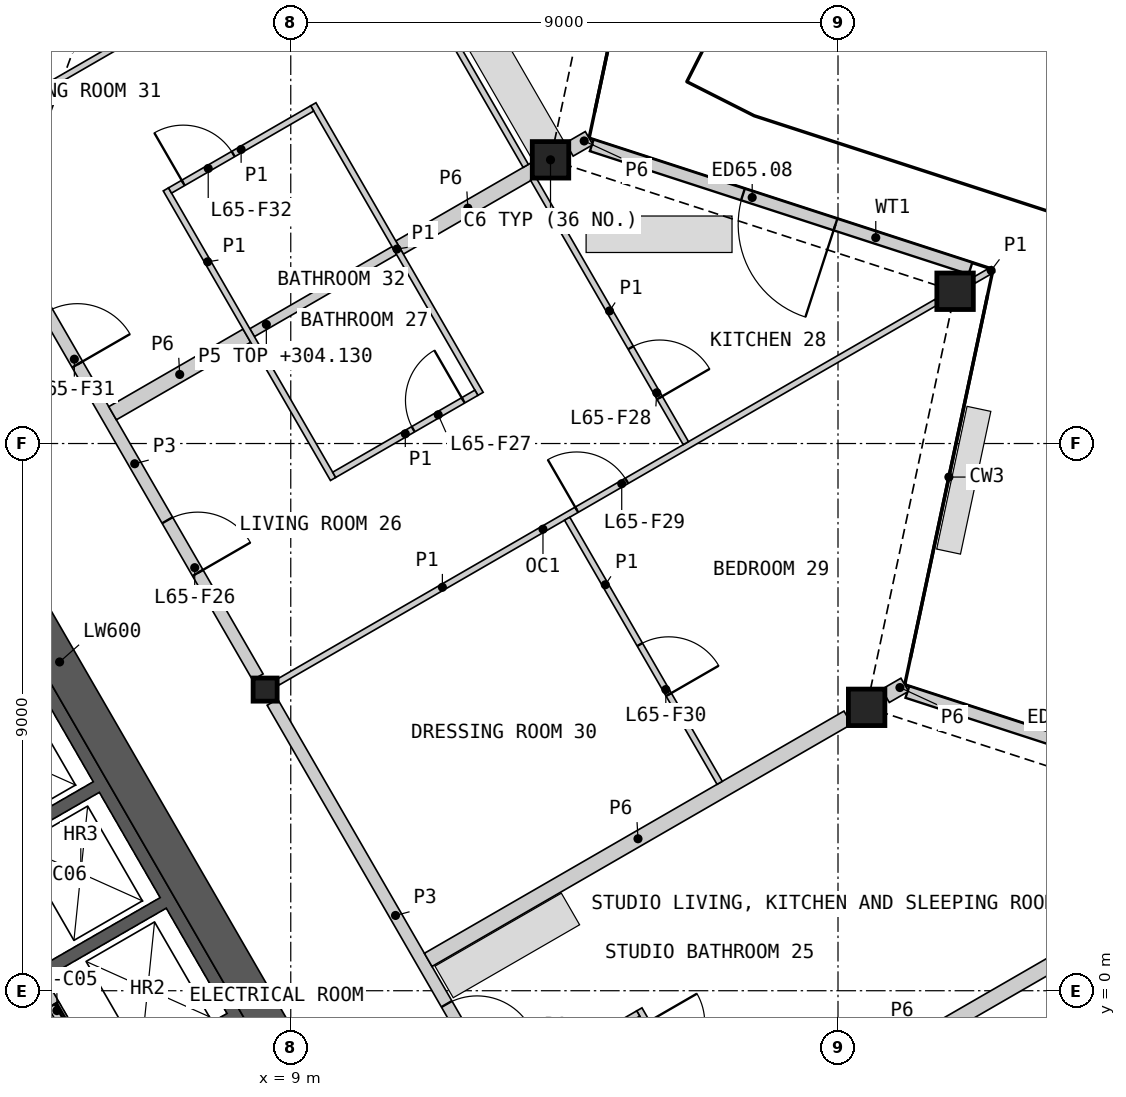
"""IFC4 building model, lengths in metres.
Left out: names, types, materials, properties, quantities, classifications, styles, units other than length and angle.
Written with IfcOpenShell. Run it as: python <this file> out.ifc"""

import sys

from ifc_helpers import new_model, si_unit, direction, frame, frame_2d, origin, origin_2d, place, context, subcontext, project, spatial, polyline, rectangle, hollow_rectangle, i_section, outline, extrude, element, fill, save


model = new_model("IFC4")
c1 = context("Model", 3, precision=1e-05, world=origin(), true_north=direction((0.0, 1.0)))
c2 = subcontext(c1, "Body", "Model", "MODEL_VIEW")
j1 = project(units=[si_unit("LENGTHUNIT", "METRE"), si_unit("PLANEANGLEUNIT", "RADIAN")], contexts=[c1])
p1 = place(None, origin())
s1 = spatial("IfcSite", under=j1, at=p1, CompositionType="ELEMENT")
p2 = place(p1, origin())
s2 = spatial("IfcBuilding", under=s1, at=p2, CompositionType="ELEMENT")
p3 = place(p2, frame((0.0, 0.0, 301.8)))
s3 = spatial("IfcBuildingStorey", under=s2, at=p3, CompositionType="ELEMENT", Elevation=301.8)
for number, where, z_axis, x_axis in (
    (1, (18.471, 4.661, 0.0), (0.0, 0.0, 1.0), (1.0, 0.0, 0.0)),
    (2, (19.926, 11.504, 0.0), (0.0, 0.0, 1.0), (1.0, 0.0, 0.0)),
    (3, (13.272, 13.666, 0.0), (0.0, 0.0, 1.0), (1.0, 0.0, 0.0)),
):
    element("IfcColumn", number, at=place(p3, frame(where, z_axis=z_axis, x_axis=x_axis)), inside=s3, PredefinedType="COLUMN", context=c2, shape_type="SweptSolid", body=[
        extrude(hollow_rectangle(XDim=0.6, YDim=0.6, WallThickness=0.04, at=origin_2d()), origin(), (0.0, 0.0, 1.0), 3.4),
    ])
p4 = place(p3, frame((8.578, 4.953, 0.0), z_axis=(0.0, 0.0, 1.0), x_axis=(1.0, 0.0, 0.0)))
e4 = element("IfcColumn", 4, at=p4, inside=s3, PredefinedType="COLUMN", context=c2, shape_type="SweptSolid", body=[
    extrude(i_section(OverallWidth=0.396, OverallDepth=0.381, WebThickness=0.019, FlangeThickness=0.03, at=origin_2d()), origin(), (0.0, 0.0, 1.0), 3.4),
])
p5 = place(p3, frame((25.398, 2.88, 0.0), z_axis=(0.0, 0.0, 1.0), x_axis=(-0.95105697409, 0.309015585424, 0.0)))
e5 = element("IfcWall", 5, at=p5, inside=s3, PredefinedType="SOLIDWALL", context=c2, shape_type="SweptSolid", body=[
    extrude(rectangle(XDim=6.579, YDim=0.2, at=frame_2d((3.29, 0.0))), origin(), (0.0, 0.0, 1.0), 2.488),
])
p6 = place(p5, frame((2.364, 0.0, 0.0)))
e6 = element("IfcOpeningElement", 6, at=p6, cuts=e5, PredefinedType="OPENING", context=c2, shape_type="SweptSolid", body=[
    extrude(rectangle(XDim=1.6, YDim=2.25, at=frame_2d((0.8, 1.125))), frame((0.0, 0.11, 0.0), z_axis=(0.0, -1.0, 0.0), x_axis=(1.0, 0.0, 0.0)), (0.0, 0.0, 1.0), 0.22),
])
p7 = place(p3, frame((20.178, 11.88, 0.0), z_axis=(0.0, 0.0, 1.0), x_axis=(-0.951053245104, 0.309027061884, 0.0)))
e7 = element("IfcWall", 7, at=p7, inside=s3, PredefinedType="SOLIDWALL", context=c2, shape_type="SweptSolid", body=[
    extrude(rectangle(XDim=6.549, YDim=0.2, at=frame_2d((3.274, 0.0))), origin(), (0.0, 0.0, 1.0), 2.488),
])
p8 = place(p7, frame((2.334, 0.0, 0.0)))
e8 = element("IfcOpeningElement", 8, at=p8, cuts=e7, PredefinedType="OPENING", context=c2, shape_type="SweptSolid", body=[
    extrude(rectangle(XDim=1.6, YDim=2.25, at=frame_2d((0.8, 1.125))), frame((0.0, 0.11, 0.0), z_axis=(0.0, -1.0, 0.0), x_axis=(1.0, 0.0, 0.0)), (0.0, 0.0, 1.0), 0.22),
])
p9 = place(p3, origin())
e9 = element("IfcWall", 9, at=p9, inside=s3, PredefinedType="SHEAR", context=c2, shape_type="SweptSolid", body=[
    extrude(outline(polyline([(1.561, 6.097), (3.731, 7.35), (8.231, -0.444), (6.061, -1.697), (5.96, -1.524), (7.952, -0.374), (6.952, 1.358), (4.96, 0.208), (4.861, 0.381), (6.852, 1.531), (5.852, 3.263), (3.861, 2.113), (3.76, 2.287), (5.752, 3.437), (4.752, 5.169), (2.76, 4.019), (2.66, 4.192), (4.652, 5.342), (3.652, 7.074), (1.66, 5.924), (1.561, 6.097)])), origin(), (0.0, 0.0, 1.0), 3.1),
])
p10 = place(p3, frame((5.817, -1.476, 0.0), z_axis=(0.0, 0.0, 1.0), x_axis=(-0.500002616675, 0.866023893041, 0.0)))
e10 = element("IfcWall", 10, at=p10, inside=s3, PredefinedType="SOLIDWALL", context=c2, shape_type="SweptSolid", body=[
    extrude(rectangle(XDim=8.373, YDim=0.2, at=frame_2d((4.187, 0.0))), origin(), (0.0, 0.0, 1.0), 3.1),
])
p11 = place(p10, frame((0.337, 0.0, 0.0)))
e11 = element("IfcOpeningElement", 11, at=p11, cuts=e10, PredefinedType="OPENING", context=c2, shape_type="SweptSolid", body=[
    extrude(rectangle(XDim=1.1, YDim=2.1, at=frame_2d((0.55, 1.05))), frame((0.0, 0.11, 0.0), z_axis=(0.0, -1.0, 0.0), x_axis=(1.0, 0.0, 0.0)), (0.0, 0.0, 1.0), 0.22),
])
p12 = place(p10, frame((2.537, 0.0, 0.0)))
e12 = element("IfcOpeningElement", 12, at=p12, cuts=e10, PredefinedType="OPENING", context=c2, shape_type="SweptSolid", body=[
    extrude(rectangle(XDim=1.1, YDim=2.1, at=frame_2d((0.55, 1.05))), frame((0.0, 0.11, 0.0), z_axis=(0.0, -1.0, 0.0), x_axis=(1.0, 0.0, 0.0)), (0.0, 0.0, 1.0), 0.22),
])
p13 = place(p10, frame((4.737, 0.0, 0.0)))
e13 = element("IfcOpeningElement", 13, at=p13, cuts=e10, PredefinedType="OPENING", context=c2, shape_type="SweptSolid", body=[
    extrude(rectangle(XDim=1.1, YDim=2.1, at=frame_2d((0.55, 1.05))), frame((0.0, 0.11, 0.0), z_axis=(0.0, -1.0, 0.0), x_axis=(1.0, 0.0, 0.0)), (0.0, 0.0, 1.0), 0.22),
])
p14 = place(p10, frame((7.037, 0.0, 0.0)))
e14 = element("IfcOpeningElement", 14, at=p14, cuts=e10, PredefinedType="OPENING", context=c2, shape_type="SweptSolid", body=[
    extrude(rectangle(XDim=0.9, YDim=2.1, at=frame_2d((0.45, 1.05))), frame((0.0, 0.11, 0.0), z_axis=(0.0, -1.0, 0.0), x_axis=(1.0, 0.0, 0.0)), (0.0, 0.0, 1.0), 0.22),
])
p15 = place(p3, frame((8.841, -0.902, 0.0), z_axis=(0.0, 0.0, 1.0), x_axis=(-0.499995618375, 0.866027933502, 0.0)))
e15 = element("IfcWall", 15, at=p15, inside=s3, PredefinedType="SHEAR", context=c2, shape_type="SweptSolid", body=[
    extrude(rectangle(XDim=14.571, YDim=0.6, at=frame_2d((7.285, 0.0))), origin(), (0.0, 0.0, 1.0), 3.1),
])
p16 = place(p3, frame((13.856, -3.988, 0.0), z_axis=(0.0, 0.0, 1.0), x_axis=(0.866021406514, 0.500006923412, 0.0)))
e16 = element("IfcWall", 16, at=p16, inside=s3, PredefinedType="PARTITIONING", context=c2, shape_type="SweptSolid", body=[
    extrude(rectangle(XDim=12.654, YDim=0.25, at=frame_2d((6.327, 0.0))), origin(), (0.0, 0.0, 1.0), 2.33),
])
p17 = place(p3, frame((4.409, 12.174, 0.0), z_axis=(0.0, 0.0, 1.0), x_axis=(0.499984266882, -0.866034487114, 0.0)))
e17 = element("IfcWall", 17, at=p17, inside=s3, PredefinedType="PARTITIONING", context=c2, shape_type="SweptSolid", body=[
    extrude(rectangle(XDim=8.099, YDim=0.2, at=frame_2d((4.049, 0.0))), origin(), (0.0, 0.0, 1.0), 3.1),
])
p18 = place(p17, frame((5.123, 0.0, 0.0)))
e18 = element("IfcOpeningElement", 18, at=p18, cuts=e17, PredefinedType="OPENING", context=c2, shape_type="SweptSolid", body=[
    extrude(rectangle(XDim=1.0, YDim=2.1, at=frame_2d((0.5, 1.05))), frame((0.0, 0.11, 0.0), z_axis=(0.0, -1.0, 0.0), x_axis=(1.0, 0.0, 0.0)), (0.0, 0.0, 1.0), 0.22),
])
p19 = place(p17, frame((1.164, 0.0, 0.0)))
e19 = element("IfcOpeningElement", 19, at=p19, cuts=e17, PredefinedType="OPENING", context=c2, shape_type="SweptSolid", body=[
    extrude(rectangle(XDim=1.0, YDim=2.1, at=frame_2d((0.5, 1.05))), frame((0.0, 0.11, 0.0), z_axis=(0.0, -1.0, 0.0), x_axis=(1.0, 0.0, 0.0)), (0.0, 0.0, 1.0), 0.22),
])
p20 = place(p3, frame((8.698, 4.745, 0.0), z_axis=(0.0, 0.0, 1.0), x_axis=(0.499984266882, -0.866034487114, 0.0)))
e20 = element("IfcWall", 20, at=p20, inside=s3, PredefinedType="PARTITIONING", context=c2, shape_type="SweptSolid", body=[
    extrude(rectangle(XDim=8.099, YDim=0.2, at=frame_2d((4.049, 0.0))), origin(), (0.0, 0.0, 1.0), 3.1),
])
p21 = place(p20, frame((5.732, 0.0, 0.0)))
e21 = element("IfcOpeningElement", 21, at=p21, cuts=e20, PredefinedType="OPENING", context=c2, shape_type="SweptSolid", body=[
    extrude(rectangle(XDim=1.0, YDim=2.1, at=frame_2d((0.5, 1.05))), frame((0.0, 0.11, 0.0), z_axis=(0.0, -1.0, 0.0), x_axis=(1.0, 0.0, 0.0)), (0.0, 0.0, 1.0), 0.22),
])
p22 = place(p3, frame((11.26, 0.507, 0.0), z_axis=(0.0, 0.0, 1.0), x_axis=(0.86602842894, 0.499994760241, 0.0)))
e22 = element("IfcWall", 22, at=p22, inside=s3, PredefinedType="PARTITIONING", context=c2, shape_type="SweptSolid", body=[
    extrude(rectangle(XDim=7.968, YDim=0.25, at=frame_2d((3.984, 0.0))), origin(), (0.0, 0.0, 1.0), 2.33),
])
p23 = place(p3, frame((6.07, 9.498, 0.0), z_axis=(0.0, 0.0, 1.0), x_axis=(0.866054858364, 0.499948979701, 0.0)))
e23 = element("IfcWall", 23, at=p23, inside=s3, PredefinedType="PARTITIONING", context=c2, shape_type="SweptSolid", body=[
    extrude(rectangle(XDim=2.55, YDim=0.25, at=frame_2d((1.275, 0.0))), origin(), (0.0, 0.0, 1.0), 2.33),
])
p24 = place(p3, frame((10.789, 12.223, 0.0), z_axis=(0.0, 0.0, 1.0), x_axis=(0.866033547976, 0.499985893582, 0.0)))
e24 = element("IfcWall", 24, at=p24, inside=s3, PredefinedType="PARTITIONING", context=c2, shape_type="SweptSolid", body=[
    extrude(rectangle(XDim=2.594, YDim=0.25, at=frame_2d((1.297, 0.0))), origin(), (0.0, 0.0, 1.0), 2.33),
])
p25 = place(p3, frame((13.582, 13.835, 0.0), z_axis=(0.0, 0.0, 1.0), x_axis=(0.865827443207, 0.500342721131, 0.0)))
e25 = element("IfcWall", 25, at=p25, inside=s3, PredefinedType="PARTITIONING", context=c2, shape_type="SweptSolid", body=[
    extrude(rectangle(XDim=0.375, YDim=0.25, at=frame_2d((0.188, 0.0))), origin(), (0.0, 0.0, 1.0), 2.33),
])
p26 = place(p3, frame((18.781, 4.849, 0.0), z_axis=(0.0, 0.0, 1.0), x_axis=(0.86609656662, 0.499876722092, 0.0)))
e26 = element("IfcWall", 26, at=p26, inside=s3, PredefinedType="PARTITIONING", context=c2, shape_type="SweptSolid", body=[
    extrude(rectangle(XDim=0.365, YDim=0.25, at=frame_2d((0.183, 0.0))), origin(), (0.0, 0.0, 1.0), 2.33),
])
p27 = place(p3, frame((8.365, 10.823, 0.0), z_axis=(0.0, 0.0, 1.0), x_axis=(0.866019956843, 0.50000943426, 0.0)))
e27 = element("IfcWall", 27, at=p27, inside=s3, PredefinedType="PLUMBINGWALL", context=c2, shape_type="SweptSolid", body=[
    extrude(rectangle(XDim=2.7, YDim=0.15, at=frame_2d((1.35, 0.0))), origin(), (0.0, 0.0, 1.0), 2.33),
])
p28 = place(p3, frame((3.474, 13.994, 0.0), z_axis=(0.0, 0.0, 1.0), x_axis=(0.866032424046, 0.499987840353, 0.0)))
e28 = element("IfcWall", 28, at=p28, inside=s3, PredefinedType="PARTITIONING", context=c2, shape_type="SweptSolid", body=[
    extrude(rectangle(XDim=12.635, YDim=0.1, at=frame_2d((6.317, 0.0))), origin(), (0.0, 0.0, 1.0), 2.33),
])
p29 = place(p28, frame((8.714, 0.0, 0.0)))
e29 = element("IfcOpeningElement", 29, at=p29, cuts=e28, PredefinedType="OPENING", context=c2, shape_type="SweptSolid", body=[
    extrude(rectangle(XDim=0.95, YDim=2.1, at=frame_2d((0.475, 1.05))), frame((0.0, 0.06, 0.0), z_axis=(0.0, -1.0, 0.0), x_axis=(1.0, 0.0, 0.0)), (0.0, 0.0, 1.0), 0.12),
])
p30 = place(p3, frame((8.786, 5.073, 0.0), z_axis=(0.0, 0.0, 1.0), x_axis=(0.86602139559, 0.500006942333, 0.0)))
e30 = element("IfcWall", 30, at=p30, inside=s3, PredefinedType="PARTITIONING", context=c2, shape_type="SweptSolid", body=[
    extrude(rectangle(XDim=12.505, YDim=0.1, at=frame_2d((6.252, 0.0))), origin(), (0.0, 0.0, 1.0), 2.33),
])
p31 = place(p30, frame((5.677, 0.0, 0.0)))
e31 = element("IfcOpeningElement", 31, at=p31, cuts=e30, PredefinedType="OPENING", context=c2, shape_type="SweptSolid", body=[
    extrude(rectangle(XDim=0.95, YDim=2.1, at=frame_2d((0.475, 1.05))), frame((0.0, 0.06, 0.0), z_axis=(0.0, -1.0, 0.0), x_axis=(1.0, 0.0, 0.0)), (0.0, 0.0, 1.0), 0.12),
])
p32 = place(p3, frame((14.733, -0.307, 0.0), z_axis=(0.0, 0.0, 1.0), x_axis=(0.499996545922, -0.866027397988, 0.0)))
e32 = element("IfcWall", 32, at=p32, inside=s3, PredefinedType="PARTITIONING", context=c2, shape_type="SweptSolid", body=[
    extrude(rectangle(XDim=5.5, YDim=0.1, at=frame_2d((2.75, 0.0))), origin(), (0.0, 0.0, 1.0), 2.33),
])
p33 = place(p32, frame((0.25, 0.0, 0.0)))
e33 = element("IfcOpeningElement", 33, at=p33, cuts=e32, PredefinedType="OPENING", context=c2, shape_type="SweptSolid", body=[
    extrude(rectangle(XDim=0.95, YDim=2.1, at=frame_2d((0.475, 1.05))), frame((0.0, 0.06, 0.0), z_axis=(0.0, -1.0, 0.0), x_axis=(1.0, 0.0, 0.0)), (0.0, 0.0, 1.0), 0.12),
])
p34 = place(p3, frame((9.371, 14.58, 0.0), z_axis=(0.0, 0.0, 1.0), x_axis=(0.499996545922, -0.866027397988, 0.0)))
e34 = element("IfcWall", 34, at=p34, inside=s3, PredefinedType="PARTITIONING", context=c2, shape_type="SweptSolid", body=[
    extrude(rectangle(XDim=5.5, YDim=0.1, at=frame_2d((2.75, 0.0))), origin(), (0.0, 0.0, 1.0), 2.33),
])
p35 = place(p3, frame((6.946, 13.18, 0.0), z_axis=(0.0, 0.0, 1.0), x_axis=(0.500015767406, -0.866016300277, 0.0)))
e35 = element("IfcWall", 35, at=p35, inside=s3, PredefinedType="PARTITIONING", context=c2, shape_type="SweptSolid", body=[
    extrude(rectangle(XDim=5.5, YDim=0.1, at=frame_2d((2.75, 0.0))), origin(), (0.0, 0.0, 1.0), 2.33),
])
p36 = place(p3, frame((10.357, 17.91, 0.0), z_axis=(0.0, 0.0, 1.0), x_axis=(0.50000754391, -0.866021048262, 0.0)))
e36 = element("IfcWall", 36, at=p36, inside=s3, PredefinedType="PARTITIONING", context=c2, shape_type="SweptSolid", body=[
    extrude(rectangle(XDim=5.016, YDim=0.1, at=frame_2d((2.508, 0.0))), origin(), (0.0, 0.0, 1.0), 2.33),
])
p37 = place(p36, frame((0.861, 0.0, 0.0)))
e37 = element("IfcOpeningElement", 37, at=p37, cuts=e36, PredefinedType="OPENING", context=c2, shape_type="SweptSolid", body=[
    extrude(rectangle(XDim=0.95, YDim=2.1, at=frame_2d((0.475, 1.05))), frame((0.0, 0.06, 0.0), z_axis=(0.0, -1.0, 0.0), x_axis=(1.0, 0.0, 0.0)), (0.0, 0.0, 1.0), 0.12),
])
p38 = place(p3, frame((13.546, 7.763, 0.0), z_axis=(0.0, 0.0, 1.0), x_axis=(0.500028620461, -0.866008879123, 0.0)))
e38 = element("IfcWall", 38, at=p38, inside=s3, PredefinedType="PARTITIONING", context=c2, shape_type="SweptSolid", body=[
    extrude(rectangle(XDim=5.016, YDim=0.1, at=frame_2d((2.508, 0.0))), origin(), (0.0, 0.0, 1.0), 2.33),
])
p39 = place(p38, frame((2.39, 0.0, 0.0)))
e39 = element("IfcOpeningElement", 39, at=p39, cuts=e38, PredefinedType="OPENING", context=c2, shape_type="SweptSolid", body=[
    extrude(rectangle(XDim=0.95, YDim=2.1, at=frame_2d((0.475, 1.05))), frame((0.0, 0.06, 0.0), z_axis=(0.0, -1.0, 0.0), x_axis=(1.0, 0.0, 0.0)), (0.0, 0.0, 1.0), 0.12),
])
p40 = place(p3, frame((12.986, 13.356, 0.0), z_axis=(0.0, 0.0, 1.0), x_axis=(0.500007128048, -0.866021288365, 0.0)))
e40 = element("IfcWall", 40, at=p40, inside=s3, PredefinedType="PARTITIONING", context=c2, shape_type="SweptSolid", body=[
    extrude(rectangle(XDim=5.023, YDim=0.1, at=frame_2d((2.512, 0.0))), origin(), (0.0, 0.0, 1.0), 2.33),
])
p41 = place(p40, frame((3.211, 0.0, 0.0)))
e41 = element("IfcOpeningElement", 41, at=p41, cuts=e40, PredefinedType="OPENING", context=c2, shape_type="SweptSolid", body=[
    extrude(rectangle(XDim=0.95, YDim=2.1, at=frame_2d((0.475, 1.05))), frame((0.0, 0.06, 0.0), z_axis=(0.0, -1.0, 0.0), x_axis=(1.0, 0.0, 0.0)), (0.0, 0.0, 1.0), 0.12),
])
p42 = place(p3, frame((7.015, 13.162, 0.0), z_axis=(0.0, 0.0, 1.0), x_axis=(0.866036505625, 0.499980770555, 0.0)))
e42 = element("IfcWall", 42, at=p42, inside=s3, PredefinedType="PARTITIONING", context=c2, shape_type="SweptSolid", body=[
    extrude(rectangle(XDim=2.7, YDim=0.1, at=frame_2d((1.35, 0.0))), origin(), (0.0, 0.0, 1.0), 2.33),
])
p43 = place(p42, frame((0.25, 0.0, 0.0)))
e43 = element("IfcOpeningElement", 43, at=p43, cuts=e42, PredefinedType="OPENING", context=c2, shape_type="SweptSolid", body=[
    extrude(rectangle(XDim=0.95, YDim=2.1, at=frame_2d((0.475, 1.05))), frame((0.0, 0.06, 0.0), z_axis=(0.0, -1.0, 0.0), x_axis=(1.0, 0.0, 0.0)), (0.0, 0.0, 1.0), 0.12),
])
p44 = place(p3, frame((9.715, 8.485, 0.0), z_axis=(0.0, 0.0, 1.0), x_axis=(0.866036505625, 0.499980770555, 0.0)))
e44 = element("IfcWall", 44, at=p44, inside=s3, PredefinedType="PARTITIONING", context=c2, shape_type="SweptSolid", body=[
    extrude(rectangle(XDim=2.7, YDim=0.1, at=frame_2d((1.35, 0.0))), origin(), (0.0, 0.0, 1.0), 2.33),
])
p45 = place(p44, frame((1.5, 0.0, 0.0)))
e45 = element("IfcOpeningElement", 45, at=p45, cuts=e44, PredefinedType="OPENING", context=c2, shape_type="SweptSolid", body=[
    extrude(rectangle(XDim=0.95, YDim=2.1, at=frame_2d((0.475, 1.05))), frame((0.0, 0.06, 0.0), z_axis=(0.0, -1.0, 0.0), x_axis=(1.0, 0.0, 0.0)), (0.0, 0.0, 1.0), 0.12),
])
p46 = place(p3, frame((12.506, -1.65, 0.0), z_axis=(0.0, 0.0, 1.0), x_axis=(0.866030925526, 0.499990435942, 0.0)))
e46 = element("IfcWall", 46, at=p46, inside=s3, PredefinedType="PARTITIONING", context=c2, shape_type="SweptSolid", body=[
    extrude(rectangle(XDim=2.55, YDim=0.1, at=frame_2d((1.275, 0.0))), origin(), (0.0, 0.0, 1.0), 2.33),
])
p47 = place(p3, frame((20.236, 11.683, 0.0), z_axis=(0.0, 0.0, 1.0), x_axis=(0.866039913117, 0.499974868256, 0.0)))
e47 = element("IfcWall", 47, at=p47, inside=s3, PredefinedType="PARTITIONING", context=c2, shape_type="SweptSolid", body=[
    extrude(rectangle(XDim=0.363, YDim=0.1, at=frame_2d((0.181, 0.0))), origin(), (0.0, 0.0, 1.0), 2.33),
])
p48 = place(p8, origin())
e48 = element("IfcDoor", 48, at=p48, inside=s3, OperationType="DOUBLE_DOOR_SINGLE_SWING", PredefinedType="DOOR", context=c2, shape_type="SweptSolid", body=[
    extrude(rectangle(XDim=1.6, YDim=2.25, at=frame_2d((0.8, 1.125))), frame((0.0, 0.025, 0.0), z_axis=(0.0, -1.0, 0.0), x_axis=(1.0, 0.0, 0.0)), (0.0, 0.0, 1.0), 0.05),
])
fill(e8, e48)
p49 = place(p11, origin())
e49 = element("IfcDoor", 49, at=p49, inside=s3, OperationType="SLIDING_TO_LEFT", PredefinedType="DOOR", context=c2, shape_type="SweptSolid", body=[
    extrude(rectangle(XDim=1.1, YDim=2.1, at=frame_2d((0.55, 1.05))), frame((0.0, 0.025, 0.0), z_axis=(0.0, -1.0, 0.0), x_axis=(1.0, 0.0, 0.0)), (0.0, 0.0, 1.0), 0.05),
])
fill(e11, e49)
p50 = place(p21, origin())
e50 = element("IfcDoor", 50, at=p50, inside=s3, OperationType="SINGLE_SWING_RIGHT", PredefinedType="DOOR", context=c2, shape_type="SweptSolid", body=[
    extrude(rectangle(XDim=1.0, YDim=2.1, at=frame_2d((0.5, 1.05))), frame((0.0, 0.025, 0.0), z_axis=(0.0, -1.0, 0.0), x_axis=(1.0, 0.0, 0.0)), (0.0, 0.0, 1.0), 0.05),
])
fill(e21, e50)
p51 = place(p18, origin())
e51 = element("IfcDoor", 51, at=p51, inside=s3, OperationType="SINGLE_SWING_RIGHT", PredefinedType="DOOR", context=c2, shape_type="SweptSolid", body=[
    extrude(rectangle(XDim=1.0, YDim=2.1, at=frame_2d((0.5, 1.05))), frame((0.0, 0.025, 0.0), z_axis=(0.0, -1.0, 0.0), x_axis=(1.0, 0.0, 0.0)), (0.0, 0.0, 1.0), 0.05),
])
fill(e18, e51)
p52 = place(p45, origin())
e52 = element("IfcDoor", 52, at=p52, inside=s3, OperationType="SINGLE_SWING_RIGHT", PredefinedType="DOOR", context=c2, shape_type="SweptSolid", body=[
    extrude(rectangle(XDim=0.95, YDim=2.1, at=frame_2d((0.475, 1.05))), frame((0.0, 0.025, 0.0), z_axis=(0.0, -1.0, 0.0), x_axis=(1.0, 0.0, 0.0)), (0.0, 0.0, 1.0), 0.05),
])
fill(e45, e52)
p53 = place(p41, origin())
e53 = element("IfcDoor", 53, at=p53, inside=s3, OperationType="SINGLE_SWING_RIGHT", PredefinedType="DOOR", context=c2, shape_type="SweptSolid", body=[
    extrude(rectangle(XDim=0.95, YDim=2.1, at=frame_2d((0.475, 1.05))), frame((0.0, 0.025, 0.0), z_axis=(0.0, -1.0, 0.0), x_axis=(1.0, 0.0, 0.0)), (0.0, 0.0, 1.0), 0.05),
])
fill(e41, e53)
p54 = place(p31, origin())
e54 = element("IfcDoor", 54, at=p54, inside=s3, OperationType="SINGLE_SWING_LEFT", PredefinedType="DOOR", context=c2, shape_type="SweptSolid", body=[
    extrude(rectangle(XDim=0.95, YDim=2.1, at=frame_2d((0.475, 1.05))), frame((0.0, 0.025, 0.0), z_axis=(0.0, -1.0, 0.0), x_axis=(1.0, 0.0, 0.0)), (0.0, 0.0, 1.0), 0.05),
])
fill(e31, e54)
p55 = place(p39, origin())
e55 = element("IfcDoor", 55, at=p55, inside=s3, OperationType="SINGLE_SWING_RIGHT", PredefinedType="DOOR", context=c2, shape_type="SweptSolid", body=[
    extrude(rectangle(XDim=0.95, YDim=2.1, at=frame_2d((0.475, 1.05))), frame((0.0, 0.025, 0.0), z_axis=(0.0, -1.0, 0.0), x_axis=(1.0, 0.0, 0.0)), (0.0, 0.0, 1.0), 0.05),
])
fill(e39, e55)
p56 = place(p19, origin())
e56 = element("IfcDoor", 56, at=p56, inside=s3, OperationType="SINGLE_SWING_RIGHT", PredefinedType="DOOR", context=c2, shape_type="SweptSolid", body=[
    extrude(rectangle(XDim=1.0, YDim=2.1, at=frame_2d((0.5, 1.05))), frame((0.0, 0.025, 0.0), z_axis=(0.0, -1.0, 0.0), x_axis=(1.0, 0.0, 0.0)), (0.0, 0.0, 1.0), 0.05),
])
fill(e19, e56)
p57 = place(p43, origin())
e57 = element("IfcDoor", 57, at=p57, inside=s3, OperationType="SINGLE_SWING_LEFT", PredefinedType="DOOR", context=c2, shape_type="SweptSolid", body=[
    extrude(rectangle(XDim=0.95, YDim=2.1, at=frame_2d((0.475, 1.05))), frame((0.0, 0.025, 0.0), z_axis=(0.0, -1.0, 0.0), x_axis=(1.0, 0.0, 0.0)), (0.0, 0.0, 1.0), 0.05),
])
fill(e43, e57)
save(model, sys.argv[1])
